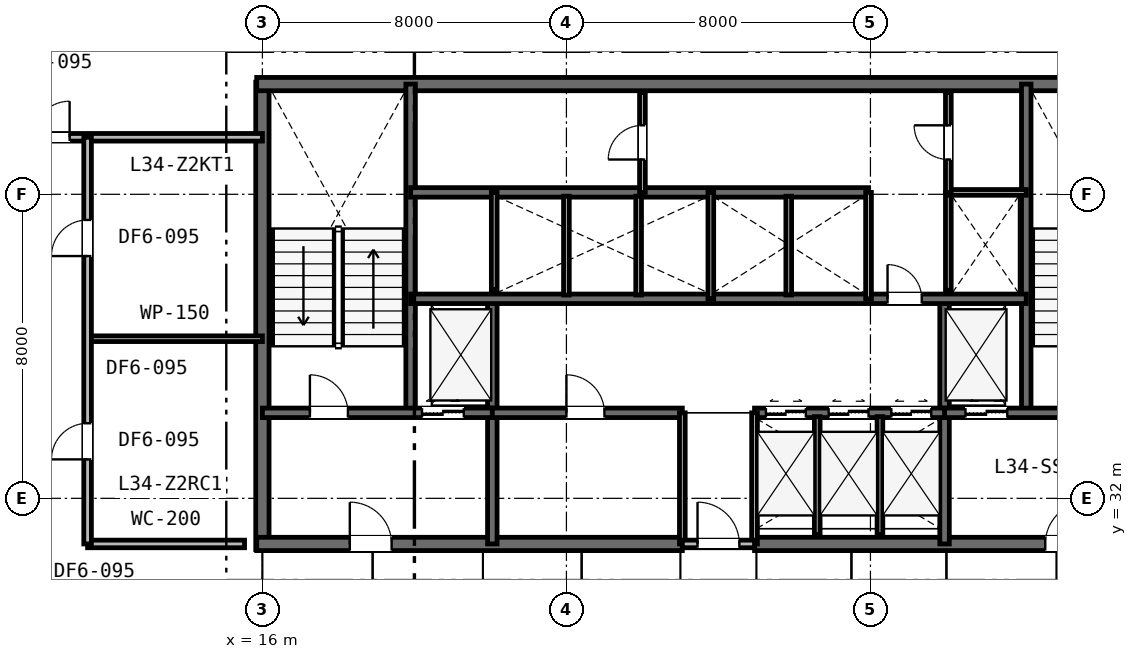
"""IFC4 building model, lengths in metres.
Left out: names, types, materials, properties, quantities, classifications, styles, units other than length and angle.
Written with IfcOpenShell. Run it as: python <this file> out.ifc"""

import sys

from ifc_helpers import new_model, si_unit, direction, frame, frame_2d, origin, place, context, subcontext, project, spatial, rectangle, extrude, element, fill, save


model = new_model("IFC4")
c1 = context("Model", 3, precision=1e-05, world=origin(), true_north=direction((0.0, 1.0)))
c2 = subcontext(c1, "Body", "Model", "MODEL_VIEW")
j1 = project(units=[si_unit("LENGTHUNIT", "METRE"), si_unit("PLANEANGLEUNIT", "RADIAN")], contexts=[c1])
p1 = place(None, origin())
s1 = spatial("IfcSite", under=j1, at=p1, CompositionType="ELEMENT")
p2 = place(p1, origin())
s2 = spatial("IfcBuilding", under=s1, at=p2, CompositionType="ELEMENT")
p3 = place(p2, frame((0.0, 0.0, 133.2)))
s3 = spatial("IfcBuildingStorey", under=s2, at=p3, CompositionType="ELEMENT", Elevation=133.2)
p4 = place(p3, frame((16.0, 30.65, 0.0), z_axis=(0.0, 0.0, 1.0), x_axis=(0.0, 1.0, 0.0)))
e1 = element("IfcWall", 1, at=p4, inside=s3, PredefinedType="SHEAR", context=c2, shape_type="SweptSolid", body=[
    extrude(rectangle(XDim=12.3, YDim=0.35, at=frame_2d((6.15, 0.0))), origin(), (0.0, 0.0, 1.0), 3.6),
])
p5 = place(p3, frame((15.85, 42.9, 0.0), z_axis=(0.0, 0.0, 1.0), x_axis=(1.0, 0.0, 0.0)))
e2 = element("IfcWall", 2, at=p5, inside=s3, PredefinedType="SHEAR", context=c2, shape_type="SweptSolid", body=[
    extrude(rectangle(XDim=24.3, YDim=0.35, at=frame_2d((12.15, 0.0))), origin(), (0.0, 0.0, 1.0), 3.6),
])
p6 = place(p3, frame((15.85, 30.8, 0.0), z_axis=(0.0, 0.0, 1.0), x_axis=(1.0, 0.0, 0.0)))
e3 = element("IfcWall", 3, at=p6, inside=s3, PredefinedType="SHEAR", context=c2, shape_type="SweptSolid", body=[
    extrude(rectangle(XDim=11.2, YDim=0.35, at=frame_2d((5.6, 0.0))), origin(), (0.0, 0.0, 1.0), 3.6),
])
p7 = place(p6, frame((2.45, 0.0, 0.0)))
e4 = element("IfcOpeningElement", 4, at=p7, cuts=e3, PredefinedType="OPENING", context=c2, shape_type="SweptSolid", body=[
    extrude(rectangle(XDim=1.1, YDim=2.15, at=frame_2d((0.55, 1.075))), frame((0.0, 0.185, 0.0), z_axis=(0.0, -1.0, 0.0), x_axis=(1.0, 0.0, 0.0)), (0.0, 0.0, 1.0), 0.37),
])
p8 = place(p3, frame((28.95, 30.8, 0.0), z_axis=(0.0, 0.0, 1.0), x_axis=(1.0, 0.0, 0.0)))
e5 = element("IfcWall", 5, at=p8, inside=s3, PredefinedType="SHEAR", context=c2, shape_type="SweptSolid", body=[
    extrude(rectangle(XDim=11.2, YDim=0.35, at=frame_2d((5.6, 0.0))), origin(), (0.0, 0.0, 1.0), 3.6),
])
p9 = place(p8, frame((7.65, 0.0, 0.0)))
e6 = element("IfcOpeningElement", 6, at=p9, cuts=e5, PredefinedType="OPENING", context=c2, shape_type="SweptSolid", body=[
    extrude(rectangle(XDim=1.1, YDim=2.15, at=frame_2d((0.55, 1.075))), frame((0.0, 0.185, 0.0), z_axis=(0.0, -1.0, 0.0), x_axis=(1.0, 0.0, 0.0)), (0.0, 0.0, 1.0), 0.37),
])
for number, where, z_axis, x_axis in (
    (7, (19.9, 34.25, 0.0), (0.0, 0.0, 1.0), (0.0, 1.0, 0.0)),
    (8, (36.1, 34.25, 0.0), (0.0, 0.0, 1.0), (0.0, 1.0, 0.0)),
):
    element("IfcWall", number, at=place(p3, frame(where, z_axis=z_axis, x_axis=x_axis)), inside=s3, PredefinedType="SHEAR", context=c2, shape_type="SweptSolid", body=[
        extrude(rectangle(XDim=8.65, YDim=0.25, at=frame_2d((4.325, 0.0))), origin(), (0.0, 0.0, 1.0), 3.6),
    ])
for number, where, z_axis, x_axis in (
    (9, (22.05, 30.8, 0.0), (0.0, 0.0, 1.0), (0.0, 1.0, 0.0)),
    (10, (33.95, 30.8, 0.0), (0.0, 0.0, 1.0), (0.0, 1.0, 0.0)),
):
    element("IfcWall", number, at=place(p3, frame(where, z_axis=z_axis, x_axis=x_axis)), inside=s3, PredefinedType="SHEAR", context=c2, shape_type="SweptSolid", body=[
        extrude(rectangle(XDim=6.45, YDim=0.25, at=frame_2d((3.225, 0.0))), origin(), (0.0, 0.0, 1.0), 3.6),
    ])
p10 = place(p3, frame((16.0, 34.25, 0.0), z_axis=(0.0, 0.0, 1.0), x_axis=(1.0, 0.0, 0.0)))
e11 = element("IfcWall", 11, at=p10, inside=s3, PredefinedType="SHEAR", context=c2, shape_type="SweptSolid", body=[
    extrude(rectangle(XDim=6.05, YDim=0.25, at=frame_2d((3.025, 0.0))), origin(), (0.0, 0.0, 1.0), 3.6),
])
p11 = place(p10, frame((1.25, 0.0, 0.0)))
e12 = element("IfcOpeningElement", 12, at=p11, cuts=e11, PredefinedType="OPENING", context=c2, shape_type="SweptSolid", body=[
    extrude(rectangle(XDim=1.0, YDim=2.15, at=frame_2d((0.5, 1.075))), frame((0.0, 0.135, 0.0), z_axis=(0.0, -1.0, 0.0), x_axis=(1.0, 0.0, 0.0)), (0.0, 0.0, 1.0), 0.27),
])
p12 = place(p10, frame((4.2, 0.0, 0.0)))
e13 = element("IfcOpeningElement", 13, at=p12, cuts=e11, PredefinedType="OPENING", context=c2, shape_type="SweptSolid", body=[
    extrude(rectangle(XDim=1.1, YDim=2.15, at=frame_2d((0.55, 1.075))), frame((0.0, 0.135, 0.0), z_axis=(0.0, -1.0, 0.0), x_axis=(1.0, 0.0, 0.0)), (0.0, 0.0, 1.0), 0.27),
])
p13 = place(p3, frame((33.95, 34.25, 0.0), z_axis=(0.0, 0.0, 1.0), x_axis=(1.0, 0.0, 0.0)))
e14 = element("IfcWall", 14, at=p13, inside=s3, PredefinedType="SHEAR", context=c2, shape_type="SweptSolid", body=[
    extrude(rectangle(XDim=6.05, YDim=0.25, at=frame_2d((3.025, 0.0))), origin(), (0.0, 0.0, 1.0), 3.6),
])
p14 = place(p13, frame((3.7, 0.0, 0.0)))
e15 = element("IfcOpeningElement", 15, at=p14, cuts=e14, PredefinedType="OPENING", context=c2, shape_type="SweptSolid", body=[
    extrude(rectangle(XDim=1.0, YDim=2.15, at=frame_2d((0.5, 1.075))), frame((0.0, 0.135, 0.0), z_axis=(0.0, -1.0, 0.0), x_axis=(1.0, 0.0, 0.0)), (0.0, 0.0, 1.0), 0.27),
])
p15 = place(p13, frame((0.55, 0.0, 0.0)))
e16 = element("IfcOpeningElement", 16, at=p15, cuts=e14, PredefinedType="OPENING", context=c2, shape_type="SweptSolid", body=[
    extrude(rectangle(XDim=1.1, YDim=2.15, at=frame_2d((0.55, 1.075))), frame((0.0, 0.135, 0.0), z_axis=(0.0, -1.0, 0.0), x_axis=(1.0, 0.0, 0.0)), (0.0, 0.0, 1.0), 0.27),
])
p16 = place(p3, frame((22.05, 34.25, 0.0), z_axis=(0.0, 0.0, 1.0), x_axis=(1.0, 0.0, 0.0)))
e17 = element("IfcWall", 17, at=p16, inside=s3, PredefinedType="SHEAR", context=c2, shape_type="SweptSolid", body=[
    extrude(rectangle(XDim=5.0, YDim=0.25, at=frame_2d((2.5, 0.0))), origin(), (0.0, 0.0, 1.0), 3.6),
])
p17 = place(p16, frame((1.95, 0.0, 0.0)))
e18 = element("IfcOpeningElement", 18, at=p17, cuts=e17, PredefinedType="OPENING", context=c2, shape_type="SweptSolid", body=[
    extrude(rectangle(XDim=1.0, YDim=2.15, at=frame_2d((0.5, 1.075))), frame((0.0, 0.135, 0.0), z_axis=(0.0, -1.0, 0.0), x_axis=(1.0, 0.0, 0.0)), (0.0, 0.0, 1.0), 0.27),
])
p18 = place(p3, frame((28.95, 34.25, 0.0), z_axis=(0.0, 0.0, 1.0), x_axis=(1.0, 0.0, 0.0)))
e19 = element("IfcWall", 19, at=p18, inside=s3, PredefinedType="SHEAR", context=c2, shape_type="SweptSolid", body=[
    extrude(rectangle(XDim=5.0, YDim=0.25, at=frame_2d((2.5, 0.0))), origin(), (0.0, 0.0, 1.0), 3.6),
])
p19 = place(p18, frame((0.3, 0.0, 0.0)))
e20 = element("IfcOpeningElement", 20, at=p19, cuts=e19, PredefinedType="OPENING", context=c2, shape_type="SweptSolid", body=[
    extrude(rectangle(XDim=1.05, YDim=2.15, at=frame_2d((0.525, 1.075))), frame((0.0, 0.135, 0.0), z_axis=(0.0, -1.0, 0.0), x_axis=(1.0, 0.0, 0.0)), (0.0, 0.0, 1.0), 0.27),
])
p20 = place(p18, frame((1.95, 0.0, 0.0)))
e21 = element("IfcOpeningElement", 21, at=p20, cuts=e19, PredefinedType="OPENING", context=c2, shape_type="SweptSolid", body=[
    extrude(rectangle(XDim=1.05, YDim=2.15, at=frame_2d((0.525, 1.075))), frame((0.0, 0.135, 0.0), z_axis=(0.0, -1.0, 0.0), x_axis=(1.0, 0.0, 0.0)), (0.0, 0.0, 1.0), 0.27),
])
p21 = place(p18, frame((3.6, 0.0, 0.0)))
e22 = element("IfcOpeningElement", 22, at=p21, cuts=e19, PredefinedType="OPENING", context=c2, shape_type="SweptSolid", body=[
    extrude(rectangle(XDim=1.05, YDim=2.15, at=frame_2d((0.525, 1.075))), frame((0.0, 0.135, 0.0), z_axis=(0.0, -1.0, 0.0), x_axis=(1.0, 0.0, 0.0)), (0.0, 0.0, 1.0), 0.27),
])
p22 = place(p3, frame((19.9, 37.25, 0.0), z_axis=(0.0, 0.0, 1.0), x_axis=(1.0, 0.0, 0.0)))
e23 = element("IfcWall", 23, at=p22, inside=s3, PredefinedType="SHEAR", context=c2, shape_type="SweptSolid", body=[
    extrude(rectangle(XDim=16.2, YDim=0.25, at=frame_2d((8.1, 0.0))), origin(), (0.0, 0.0, 1.0), 3.6),
])
p23 = place(p22, frame((12.55, 0.0, 0.0)))
e24 = element("IfcOpeningElement", 24, at=p23, cuts=e23, PredefinedType="OPENING", context=c2, shape_type="SweptSolid", body=[
    extrude(rectangle(XDim=0.9, YDim=2.15, at=frame_2d((0.45, 1.075))), frame((0.0, 0.135, 0.0), z_axis=(0.0, -1.0, 0.0), x_axis=(1.0, 0.0, 0.0)), (0.0, 0.0, 1.0), 0.27),
])
p24 = place(p3, frame((19.9, 40.05, 0.0), z_axis=(0.0, 0.0, 1.0), x_axis=(1.0, 0.0, 0.0)))
e25 = element("IfcWall", 25, at=p24, inside=s3, PredefinedType="SHEAR", context=c2, shape_type="SweptSolid", body=[
    extrude(rectangle(XDim=12.05, YDim=0.25, at=frame_2d((6.025, 0.0))), origin(), (0.0, 0.0, 1.0), 3.6),
])
p25 = place(p3, frame((27.05, 30.8, 0.0), z_axis=(0.0, 0.0, 1.0), x_axis=(0.0, 1.0, 0.0)))
e26 = element("IfcWall", 26, at=p25, inside=s3, PredefinedType="PLUMBINGWALL", context=c2, shape_type="SweptSolid", body=[
    extrude(rectangle(XDim=3.45, YDim=0.15, at=frame_2d((1.725, 0.0))), origin(), (0.0, 0.0, 1.0), 2.96),
])
p26 = place(p3, frame((28.95, 30.8, 0.0), z_axis=(0.0, 0.0, 1.0), x_axis=(0.0, 1.0, 0.0)))
e27 = element("IfcWall", 27, at=p26, inside=s3, PredefinedType="PLUMBINGWALL", context=c2, shape_type="SweptSolid", body=[
    extrude(rectangle(XDim=3.45, YDim=0.15, at=frame_2d((1.725, 0.0))), origin(), (0.0, 0.0, 1.0), 3.33),
])
p27 = place(p3, frame((27.05, 30.8, 0.0), z_axis=(0.0, 0.0, 1.0), x_axis=(1.0, 0.0, 0.0)))
e28 = element("IfcWall", 28, at=p27, inside=s3, PredefinedType="PARTITIONING", context=c2, shape_type="SweptSolid", body=[
    extrude(rectangle(XDim=1.9, YDim=0.2, at=frame_2d((0.95, 0.0))), origin(), (0.0, 0.0, 1.0), 2.96),
])
p28 = place(p27, frame((0.4, 0.0, 0.0)))
e29 = element("IfcOpeningElement", 29, at=p28, cuts=e28, PredefinedType="OPENING", context=c2, shape_type="SweptSolid", body=[
    extrude(rectangle(XDim=1.1, YDim=2.15, at=frame_2d((0.55, 1.075))), frame((0.0, 0.11, 0.0), z_axis=(0.0, -1.0, 0.0), x_axis=(1.0, 0.0, 0.0)), (0.0, 0.0, 1.0), 0.22),
])
for number, where, z_axis, x_axis in (
    (30, (30.6, 31.05, 0.0), (0.0, 0.0, 1.0), (0.0, 1.0, 0.0)),
    (31, (32.25, 31.05, 0.0), (0.0, 0.0, 1.0), (0.0, 1.0, 0.0)),
):
    element("IfcWall", number, at=place(p3, frame(where, z_axis=z_axis, x_axis=x_axis)), inside=s3, PredefinedType="PLUMBINGWALL", context=c2, shape_type="SweptSolid", body=[
        extrude(rectangle(XDim=3.1, YDim=0.15, at=frame_2d((1.55, 0.0))), origin(), (0.0, 0.0, 1.0), 3.33),
    ])
p29 = place(p3, frame((22.1, 37.49, 0.0), z_axis=(0.0, 0.0, 1.0), x_axis=(0.0, 1.0, 0.0)))
e32 = element("IfcWall", 32, at=p29, inside=s3, PredefinedType="PLUMBINGWALL", context=c2, shape_type="SweptSolid", body=[
    extrude(rectangle(XDim=2.56, YDim=0.15, at=frame_2d((1.28, 0.0))), origin(), (0.0, 0.0, 1.0), 3.33),
])
p30 = place(p3, frame((27.8, 37.25, 0.0), z_axis=(0.0, 0.0, 1.0), x_axis=(0.0, 1.0, 0.0)))
e33 = element("IfcWall", 33, at=p30, inside=s3, PredefinedType="PLUMBINGWALL", context=c2, shape_type="SweptSolid", body=[
    extrude(rectangle(XDim=2.8, YDim=0.15, at=frame_2d((1.4, 0.0))), origin(), (0.0, 0.0, 1.0), 3.33),
])
for number, where, z_axis, x_axis in (
    (34, (24.0, 37.35, 0.0), (0.0, 0.0, 1.0), (0.0, 1.0, 0.0)),
    (35, (25.9, 37.35, 0.0), (0.0, 0.0, 1.0), (0.0, 1.0, 0.0)),
):
    element("IfcWall", number, at=place(p3, frame(where, z_axis=z_axis, x_axis=x_axis)), inside=s3, PredefinedType="PLUMBINGWALL", context=c2, shape_type="SweptSolid", body=[
        extrude(rectangle(XDim=2.6, YDim=0.15, at=frame_2d((1.3, 0.0))), origin(), (0.0, 0.0, 1.0), 3.33),
    ])
p31 = place(p3, frame((31.95, 37.25, 0.0), z_axis=(0.0, 0.0, 1.0), x_axis=(0.0, 1.0, 0.0)))
e36 = element("IfcWall", 36, at=p31, inside=s3, PredefinedType="PLUMBINGWALL", context=c2, shape_type="SweptSolid", body=[
    extrude(rectangle(XDim=2.8, YDim=0.15, at=frame_2d((1.4, 0.0))), origin(), (0.0, 0.0, 1.0), 3.33),
])
p32 = place(p3, frame((29.85, 37.35, 0.0), z_axis=(0.0, 0.0, 1.0), x_axis=(0.0, 1.0, 0.0)))
e37 = element("IfcWall", 37, at=p32, inside=s3, PredefinedType="PLUMBINGWALL", context=c2, shape_type="SweptSolid", body=[
    extrude(rectangle(XDim=2.6, YDim=0.15, at=frame_2d((1.3, 0.0))), origin(), (0.0, 0.0, 1.0), 3.33),
])
p33 = place(p3, frame((34.05, 37.473, 0.0), z_axis=(0.0, 0.0, 1.0), x_axis=(0.0, 1.0, 0.0)))
e38 = element("IfcWall", 38, at=p33, inside=s3, PredefinedType="PLUMBINGWALL", context=c2, shape_type="SweptSolid", body=[
    extrude(rectangle(XDim=2.577, YDim=0.15, at=frame_2d((1.288, 0.0))), origin(), (0.0, 0.0, 1.0), 3.33),
])
p34 = place(p3, frame((34.05, 40.05, 0.0), z_axis=(0.0, 0.0, 1.0), x_axis=(1.0, 0.0, 0.0)))
e39 = element("IfcWall", 39, at=p34, inside=s3, PredefinedType="PARTITIONING", context=c2, shape_type="SweptSolid", body=[
    extrude(rectangle(XDim=2.05, YDim=0.15, at=frame_2d((1.025, 0.0))), origin(), (0.0, 0.0, 1.0), 3.33),
])
p35 = place(p3, frame((34.05, 40.05, 0.0), z_axis=(0.0, 0.0, 1.0), x_axis=(0.0, 1.0, 0.0)))
e40 = element("IfcWall", 40, at=p35, inside=s3, PredefinedType="PARTITIONING", context=c2, shape_type="SweptSolid", body=[
    extrude(rectangle(XDim=2.63, YDim=0.15, at=frame_2d((1.315, 0.0))), origin(), (0.0, 0.0, 1.0), 3.33),
])
p36 = place(p35, frame((0.865, 0.0, 0.0)))
e41 = element("IfcOpeningElement", 41, at=p36, cuts=e40, PredefinedType="OPENING", context=c2, shape_type="SweptSolid", body=[
    extrude(rectangle(XDim=0.9, YDim=2.15, at=frame_2d((0.45, 1.075))), frame((0.0, 0.085, 0.0), z_axis=(0.0, -1.0, 0.0), x_axis=(1.0, 0.0, 0.0)), (0.0, 0.0, 1.0), 0.17),
])
p37 = place(p3, frame((26.0, 40.05, 0.0), z_axis=(0.0, 0.0, 1.0), x_axis=(0.0, 1.0, 0.0)))
e42 = element("IfcWall", 42, at=p37, inside=s3, PredefinedType="PARTITIONING", context=c2, shape_type="SweptSolid", body=[
    extrude(rectangle(XDim=2.63, YDim=0.15, at=frame_2d((1.315, 0.0))), origin(), (0.0, 0.0, 1.0), 3.33),
])
p38 = place(p37, frame((0.865, 0.0, 0.0)))
e43 = element("IfcOpeningElement", 43, at=p38, cuts=e42, PredefinedType="OPENING", context=c2, shape_type="SweptSolid", body=[
    extrude(rectangle(XDim=0.9, YDim=2.15, at=frame_2d((0.45, 1.075))), frame((0.0, 0.085, 0.0), z_axis=(0.0, -1.0, 0.0), x_axis=(1.0, 0.0, 0.0)), (0.0, 0.0, 1.0), 0.17),
])
p39 = place(p3, frame((11.4, 30.8, 0.0), z_axis=(0.0, 0.0, 1.0), x_axis=(1.0, 0.0, 0.0)))
e44 = element("IfcWall", 44, at=p39, inside=s3, PredefinedType="PARTITIONING", context=c2, shape_type="SweptSolid", body=[
    extrude(rectangle(XDim=4.13, YDim=0.2, at=frame_2d((2.065, 0.0))), origin(), (0.0, 0.0, 1.0), 2.93),
])
p40 = place(p3, frame((0.1, 41.5, 0.0), z_axis=(0.0, 0.0, 1.0), x_axis=(1.0, 0.0, 0.0)))
e45 = element("IfcWall", 45, at=p40, inside=s3, PredefinedType="PARTITIONING", context=c2, shape_type="SweptSolid", body=[
    extrude(rectangle(XDim=15.9, YDim=0.2, at=frame_2d((7.95, 0.0))), origin(), (0.0, 0.0, 1.0), 2.93),
])
p41 = place(p40, frame((9.877, 0.0, 0.0)))
e46 = element("IfcOpeningElement", 46, at=p41, cuts=e45, PredefinedType="OPENING", context=c2, shape_type="SweptSolid", body=[
    extrude(rectangle(XDim=0.95, YDim=2.15, at=frame_2d((0.475, 1.075))), frame((0.0, 0.11, 0.0), z_axis=(0.0, -1.0, 0.0), x_axis=(1.0, 0.0, 0.0)), (0.0, 0.0, 1.0), 0.22),
])
p42 = place(p3, frame((11.4, 36.2, 0.0), z_axis=(0.0, 0.0, 1.0), x_axis=(1.0, 0.0, 0.0)))
e47 = element("IfcWall", 47, at=p42, inside=s3, PredefinedType="PARTITIONING", context=c2, shape_type="SweptSolid", body=[
    extrude(rectangle(XDim=4.6, YDim=0.15, at=frame_2d((2.3, 0.0))), origin(), (0.0, 0.0, 1.0), 3.33),
])
p43 = place(p3, frame((11.4, 30.8, 0.0), z_axis=(0.0, 0.0, 1.0), x_axis=(0.0, 1.0, 0.0)))
e48 = element("IfcWall", 48, at=p43, inside=s3, PredefinedType="PARTITIONING", context=c2, shape_type="SweptSolid", body=[
    extrude(rectangle(XDim=10.7, YDim=0.2, at=frame_2d((5.35, 0.0))), origin(), (0.0, 0.0, 1.0), 2.93),
])
p44 = place(p43, frame((2.225, 0.0, 0.0)))
e49 = element("IfcOpeningElement", 49, at=p44, cuts=e48, PredefinedType="OPENING", context=c2, shape_type="SweptSolid", body=[
    extrude(rectangle(XDim=0.95, YDim=2.15, at=frame_2d((0.475, 1.075))), frame((0.0, 0.11, 0.0), z_axis=(0.0, -1.0, 0.0), x_axis=(1.0, 0.0, 0.0)), (0.0, 0.0, 1.0), 0.22),
])
p45 = place(p43, frame((7.575, 0.0, 0.0)))
e50 = element("IfcOpeningElement", 50, at=p45, cuts=e48, PredefinedType="OPENING", context=c2, shape_type="SweptSolid", body=[
    extrude(rectangle(XDim=0.95, YDim=2.15, at=frame_2d((0.475, 1.075))), frame((0.0, 0.11, 0.0), z_axis=(0.0, -1.0, 0.0), x_axis=(1.0, 0.0, 0.0)), (0.0, 0.0, 1.0), 0.22),
])
p46 = place(p28, origin())
e51 = element("IfcDoor", 51, at=p46, inside=s3, OperationType="SINGLE_SWING_LEFT", PredefinedType="DOOR", context=c2, shape_type="SweptSolid", body=[
    extrude(rectangle(XDim=1.1, YDim=2.15, at=frame_2d((0.55, 1.075))), frame((0.0, 0.025, 0.0), z_axis=(0.0, -1.0, 0.0), x_axis=(1.0, 0.0, 0.0)), (0.0, 0.0, 1.0), 0.05),
])
fill(e29, e51)
p47 = place(p11, origin())
e52 = element("IfcDoor", 52, at=p47, inside=s3, OperationType="SINGLE_SWING_LEFT", PredefinedType="DOOR", context=c2, shape_type="SweptSolid", body=[
    extrude(rectangle(XDim=1.0, YDim=2.15, at=frame_2d((0.5, 1.075))), frame((0.0, 0.025, 0.0), z_axis=(0.0, -1.0, 0.0), x_axis=(1.0, 0.0, 0.0)), (0.0, 0.0, 1.0), 0.05),
])
fill(e12, e52)
p48 = place(p7, origin())
e53 = element("IfcDoor", 53, at=p48, inside=s3, OperationType="SINGLE_SWING_LEFT", PredefinedType="DOOR", context=c2, shape_type="SweptSolid", body=[
    extrude(rectangle(XDim=1.1, YDim=2.15, at=frame_2d((0.55, 1.075))), frame((0.0, 0.025, 0.0), z_axis=(0.0, -1.0, 0.0), x_axis=(1.0, 0.0, 0.0)), (0.0, 0.0, 1.0), 0.05),
])
fill(e4, e53)
p49 = place(p9, origin())
e54 = element("IfcDoor", 54, at=p49, inside=s3, OperationType="SINGLE_SWING_RIGHT", PredefinedType="DOOR", context=c2, shape_type="SweptSolid", body=[
    extrude(rectangle(XDim=1.1, YDim=2.15, at=frame_2d((0.55, 1.075))), frame((0.0, 0.025, 0.0), z_axis=(0.0, -1.0, 0.0), x_axis=(1.0, 0.0, 0.0)), (0.0, 0.0, 1.0), 0.05),
])
fill(e6, e54)
p50 = place(p17, origin())
e55 = element("IfcDoor", 55, at=p50, inside=s3, OperationType="SINGLE_SWING_LEFT", PredefinedType="DOOR", context=c2, shape_type="SweptSolid", body=[
    extrude(rectangle(XDim=1.0, YDim=2.15, at=frame_2d((0.5, 1.075))), frame((0.0, 0.025, 0.0), z_axis=(0.0, -1.0, 0.0), x_axis=(1.0, 0.0, 0.0)), (0.0, 0.0, 1.0), 0.05),
])
fill(e18, e55)
p51 = place(p23, origin())
e56 = element("IfcDoor", 56, at=p51, inside=s3, OperationType="SINGLE_SWING_LEFT", PredefinedType="DOOR", context=c2, shape_type="SweptSolid", body=[
    extrude(rectangle(XDim=0.9, YDim=2.15, at=frame_2d((0.45, 1.075))), frame((0.0, 0.025, 0.0), z_axis=(0.0, -1.0, 0.0), x_axis=(1.0, 0.0, 0.0)), (0.0, 0.0, 1.0), 0.05),
])
fill(e24, e56)
p52 = place(p36, origin())
e57 = element("IfcDoor", 57, at=p52, inside=s3, OperationType="SINGLE_SWING_RIGHT", PredefinedType="DOOR", context=c2, shape_type="SweptSolid", body=[
    extrude(rectangle(XDim=0.9, YDim=2.15, at=frame_2d((0.45, 1.075))), frame((0.0, 0.025, 0.0), z_axis=(0.0, -1.0, 0.0), x_axis=(1.0, 0.0, 0.0)), (0.0, 0.0, 1.0), 0.05),
])
fill(e41, e57)
p53 = place(p38, origin())
e58 = element("IfcDoor", 58, at=p53, inside=s3, OperationType="SINGLE_SWING_LEFT", PredefinedType="DOOR", context=c2, shape_type="SweptSolid", body=[
    extrude(rectangle(XDim=0.9, YDim=2.15, at=frame_2d((0.45, 1.075))), frame((0.0, 0.025, 0.0), z_axis=(0.0, -1.0, 0.0), x_axis=(1.0, 0.0, 0.0)), (0.0, 0.0, 1.0), 0.05),
])
fill(e43, e58)
p54 = place(p41, origin())
e59 = element("IfcDoor", 59, at=p54, inside=s3, OperationType="SINGLE_SWING_RIGHT", PredefinedType="DOOR", context=c2, shape_type="SweptSolid", body=[
    extrude(rectangle(XDim=0.95, YDim=2.15, at=frame_2d((0.475, 1.075))), frame((0.0, 0.025, 0.0), z_axis=(0.0, -1.0, 0.0), x_axis=(1.0, 0.0, 0.0)), (0.0, 0.0, 1.0), 0.05),
])
fill(e46, e59)
p55 = place(p44, origin())
e60 = element("IfcDoor", 60, at=p55, inside=s3, OperationType="SINGLE_SWING_LEFT", PredefinedType="DOOR", context=c2, shape_type="SweptSolid", body=[
    extrude(rectangle(XDim=0.95, YDim=2.15, at=frame_2d((0.475, 1.075))), frame((0.0, 0.025, 0.0), z_axis=(0.0, -1.0, 0.0), x_axis=(1.0, 0.0, 0.0)), (0.0, 0.0, 1.0), 0.05),
])
fill(e49, e60)
p56 = place(p45, origin())
e61 = element("IfcDoor", 61, at=p56, inside=s3, OperationType="SINGLE_SWING_LEFT", PredefinedType="DOOR", context=c2, shape_type="SweptSolid", body=[
    extrude(rectangle(XDim=0.95, YDim=2.15, at=frame_2d((0.475, 1.075))), frame((0.0, 0.025, 0.0), z_axis=(0.0, -1.0, 0.0), x_axis=(1.0, 0.0, 0.0)), (0.0, 0.0, 1.0), 0.05),
])
fill(e50, e61)
p57 = place(p12, origin())
e62 = element("IfcDoor", 62, at=p57, inside=s3, OperationType="DOUBLE_DOOR_SLIDING", PredefinedType="DOOR", context=c2, shape_type="SweptSolid", body=[
    extrude(rectangle(XDim=1.1, YDim=2.15, at=frame_2d((0.55, 1.075))), frame((0.0, 0.025, 0.0), z_axis=(0.0, -1.0, 0.0), x_axis=(1.0, 0.0, 0.0)), (0.0, 0.0, 1.0), 0.05),
])
fill(e13, e62)
p58 = place(p15, origin())
e63 = element("IfcDoor", 63, at=p58, inside=s3, OperationType="DOUBLE_DOOR_SLIDING", PredefinedType="DOOR", context=c2, shape_type="SweptSolid", body=[
    extrude(rectangle(XDim=1.1, YDim=2.15, at=frame_2d((0.55, 1.075))), frame((0.0, 0.025, 0.0), z_axis=(0.0, -1.0, 0.0), x_axis=(1.0, 0.0, 0.0)), (0.0, 0.0, 1.0), 0.05),
])
fill(e16, e63)
p59 = place(p19, origin())
e64 = element("IfcDoor", 64, at=p59, inside=s3, OperationType="DOUBLE_DOOR_SLIDING", PredefinedType="DOOR", context=c2, shape_type="SweptSolid", body=[
    extrude(rectangle(XDim=1.05, YDim=2.15, at=frame_2d((0.525, 1.075))), frame((0.0, 0.025, 0.0), z_axis=(0.0, -1.0, 0.0), x_axis=(1.0, 0.0, 0.0)), (0.0, 0.0, 1.0), 0.05),
])
fill(e20, e64)
p60 = place(p20, origin())
e65 = element("IfcDoor", 65, at=p60, inside=s3, OperationType="DOUBLE_DOOR_SLIDING", PredefinedType="DOOR", context=c2, shape_type="SweptSolid", body=[
    extrude(rectangle(XDim=1.05, YDim=2.15, at=frame_2d((0.525, 1.075))), frame((0.0, 0.025, 0.0), z_axis=(0.0, -1.0, 0.0), x_axis=(1.0, 0.0, 0.0)), (0.0, 0.0, 1.0), 0.05),
])
fill(e21, e65)
p61 = place(p21, origin())
e66 = element("IfcDoor", 66, at=p61, inside=s3, OperationType="DOUBLE_DOOR_SLIDING", PredefinedType="DOOR", context=c2, shape_type="SweptSolid", body=[
    extrude(rectangle(XDim=1.05, YDim=2.15, at=frame_2d((0.525, 1.075))), frame((0.0, 0.025, 0.0), z_axis=(0.0, -1.0, 0.0), x_axis=(1.0, 0.0, 0.0)), (0.0, 0.0, 1.0), 0.05),
])
fill(e22, e66)
save(model, sys.argv[1])
